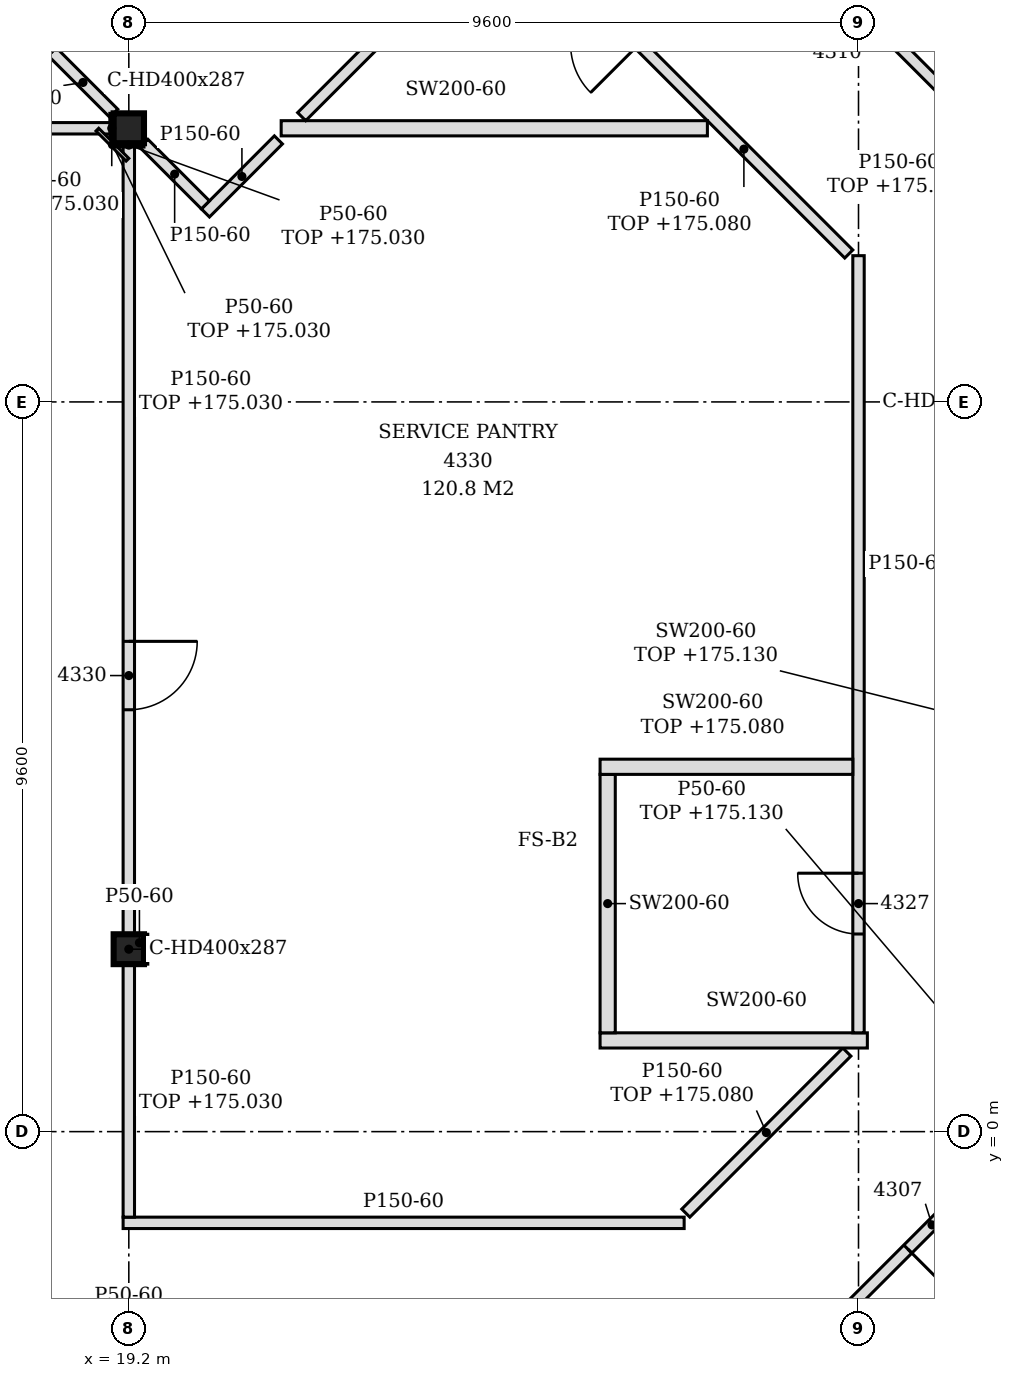
"""IFC4 building model, lengths in metres.
Left out: names, types, materials, properties, quantities, classifications, styles, units other than length and angle.
Written with IfcOpenShell. Run it as: python <this file> out.ifc"""

import sys

from ifc_helpers import new_model, si_unit, direction, frame, frame_2d, origin, origin_2d, place, context, subcontext, project, spatial, polyline, rectangle, i_section, outline, extrude, element, fill, save


model = new_model("IFC4")
c1 = context("Model", 3, precision=1e-05, world=origin(), true_north=direction((0.0, 1.0)))
c2 = subcontext(c1, "Body", "Model", "MODEL_VIEW")
j1 = project(units=[si_unit("LENGTHUNIT", "METRE"), si_unit("PLANEANGLEUNIT", "RADIAN")], contexts=[c1])
p1 = place(None, origin())
s1 = spatial("IfcSite", under=j1, at=p1, CompositionType="ELEMENT")
p2 = place(p1, origin())
s2 = spatial("IfcBuilding", under=s1, at=p2, CompositionType="ELEMENT")
p3 = place(p2, frame((0.0, 0.0, 172.2)))
s3 = spatial("IfcBuildingStorey", under=s2, at=p3, CompositionType="ELEMENT", Elevation=172.2)
for number, where, z_axis, x_axis in (
    (1, (19.2, 2.4, -0.15), (0.0, 0.0, 1.0), (1.0, 0.0, 0.0)),
    (2, (19.2, 13.2, -0.15), (0.0, 0.0, 1.0), (1.0, 0.0, 0.0)),
):
    element("IfcColumn", number, at=place(p3, frame(where, z_axis=z_axis, x_axis=x_axis)), inside=s3, PredefinedType="COLUMN", context=c2, shape_type="SweptSolid", body=[
        extrude(i_section(OverallWidth=0.399, OverallDepth=0.393, WebThickness=0.023, FlangeThickness=0.037, FilletRadius=0.015, at=origin_2d()), origin(), (0.0, 0.0, 1.0), 3.6),
    ])
p4 = place(p3, frame((22.722, -8.272, 0.0), z_axis=(0.0, 0.0, 1.0), x_axis=(0.707106781187, 0.707106781187, 0.0)))
e3 = element("IfcWall", 3, at=p4, inside=s3, PredefinedType="PARTITIONING", context=c2, shape_type="SweptSolid", body=[
    extrude(rectangle(XDim=11.549, YDim=0.15, at=frame_2d((5.774, 0.0))), origin(), (0.0, 0.0, 1.0), 2.88),
])
p5 = place(p4, frame((2.873, 0.0, 0.0)))
e4 = element("IfcOpeningElement", 4, at=p5, cuts=e3, PredefinedType="OPENING", context=c2, shape_type="SweptSolid", body=[
    extrude(rectangle(XDim=0.9, YDim=2.1, at=frame_2d((0.45, 1.05))), frame((0.0, 0.085, 0.0), z_axis=(0.0, -1.0, 0.0), x_axis=(1.0, 0.0, 0.0)), (0.0, 0.0, 1.0), 0.17),
])
p6 = place(p4, frame((6.143, 0.0, 0.0)))
e5 = element("IfcOpeningElement", 5, at=p6, cuts=e3, PredefinedType="OPENING", context=c2, shape_type="SweptSolid", body=[
    extrude(rectangle(XDim=0.9, YDim=2.1, at=frame_2d((0.45, 1.05))), frame((0.0, 0.085, 0.0), z_axis=(0.0, -1.0, 0.0), x_axis=(1.0, 0.0, 0.0)), (0.0, 0.0, 1.0), 0.17),
])
p7 = place(p4, frame((9.513, 0.0, 0.0)))
e6 = element("IfcOpeningElement", 6, at=p7, cuts=e3, PredefinedType="OPENING", context=c2, shape_type="SweptSolid", body=[
    extrude(rectangle(XDim=0.9, YDim=2.1, at=frame_2d((0.45, 1.05))), frame((0.0, 0.085, 0.0), z_axis=(0.0, -1.0, 0.0), x_axis=(1.0, 0.0, 0.0)), (0.0, 0.0, 1.0), 0.17),
])
p8 = place(p3, frame((19.125, -1.2, 0.0), z_axis=(0.0, 0.0, 1.0), x_axis=(1.0, 0.0, 0.0)))
e7 = element("IfcWall", 7, at=p8, inside=s3, PredefinedType="PARTITIONING", context=c2, shape_type="SweptSolid", body=[
    extrude(outline(polyline([(0.0, 0.0), (7.381, 0.0), (7.381, 3.45), (0.225, 3.45), (0.223, 2.83), (0.0, 2.83), (0.0, 0.0)])), frame((0.0, 0.075, 0.0), z_axis=(0.0, -1.0, 0.0), x_axis=(1.0, 0.0, 0.0)), (0.0, 0.0, 1.0), 0.15),
])
p9 = place(p3, frame((19.2, -1.125, 0.0), z_axis=(0.0, 0.0, 1.0), x_axis=(0.0, 1.0, 0.0)))
e8 = element("IfcWall", 8, at=p9, inside=s3, PredefinedType="PARTITIONING", context=c2, shape_type="SweptSolid", body=[
    extrude(rectangle(XDim=3.329, YDim=0.15, at=frame_2d((1.664, 0.0))), origin(), (0.0, 0.0, 1.0), 2.83),
])
p10 = place(p3, frame((26.528, -1.072, 0.0), z_axis=(0.0, 0.0, 1.0), x_axis=(0.707106781187, 0.707106781187, 0.0)))
e9 = element("IfcWall", 9, at=p10, inside=s3, PredefinedType="PARTITIONING", context=c2, shape_type="SweptSolid", body=[
    extrude(rectangle(XDim=2.997, YDim=0.15, at=frame_2d((1.498, 0.0))), origin(), (0.0, 0.0, 1.0), 2.88),
])
p11 = place(p3, frame((25.4, 1.2, 0.0), z_axis=(0.0, 0.0, 1.0), x_axis=(1.0, 0.0, 0.0)))
e10 = element("IfcWall", 10, at=p11, inside=s3, PredefinedType="PARTITIONING", context=c2, shape_type="SweptSolid", body=[
    extrude(rectangle(XDim=3.517, YDim=0.2, at=frame_2d((1.758, 0.0))), origin(), (0.0, 0.0, 1.0), 3.45),
])
p12 = place(p3, frame((25.5, 1.3, 0.0), z_axis=(0.0, 0.0, 1.0), x_axis=(0.0, 1.0, 0.0)))
e11 = element("IfcWall", 11, at=p12, inside=s3, PredefinedType="PARTITIONING", context=c2, shape_type="SweptSolid", body=[
    extrude(outline(polyline([(0.0, 0.0), (3.4, 0.0), (3.4, 2.88), (3.245, 2.88), (3.243, 3.45), (0.0, 3.45), (0.0, 0.0)])), frame((0.0, 0.1, 0.0), z_axis=(0.0, -1.0, 0.0), x_axis=(1.0, 0.0, 0.0)), (0.0, 0.0, 1.0), 0.2),
])
p13 = place(p3, frame((28.8, 1.3, 0.0), z_axis=(0.0, 0.0, 1.0), x_axis=(0.0, 1.0, 0.0)))
e12 = element("IfcWall", 12, at=p13, inside=s3, PredefinedType="PARTITIONING", context=c2, shape_type="SweptSolid", body=[
    extrude(outline(polyline([(0.0, 0.0), (10.224, 0.0), (10.224, 3.45), (8.255, 3.45), (8.253, 2.88), (8.045, 2.88), (8.043, 3.45), (3.455, 3.45), (3.453, 2.88), (3.245, 2.88), (3.243, 3.45), (0.0, 3.45), (0.0, 0.0)])), frame((0.0, 0.075, 0.0), z_axis=(0.0, -1.0, 0.0), x_axis=(1.0, 0.0, 0.0)), (0.0, 0.0, 1.0), 0.15),
])
p14 = place(p13, frame((1.3, 0.0, 0.0)))
e13 = element("IfcOpeningElement", 13, at=p14, cuts=e12, PredefinedType="OPENING", context=c2, shape_type="SweptSolid", body=[
    extrude(rectangle(XDim=0.8, YDim=2.1, at=frame_2d((0.4, 1.05))), frame((0.0, 0.085, 0.0), z_axis=(0.0, -1.0, 0.0), x_axis=(1.0, 0.0, 0.0)), (0.0, 0.0, 1.0), 0.17),
])
p15 = place(p3, frame((19.2, 2.596, 0.0), z_axis=(0.0, 0.0, 1.0), x_axis=(0.0, 1.0, 0.0)))
e14 = element("IfcWall", 14, at=p15, inside=s3, PredefinedType="PARTITIONING", context=c2, shape_type="SweptSolid", body=[
    extrude(rectangle(XDim=10.407, YDim=0.15, at=frame_2d((5.204, 0.0))), origin(), (0.0, 0.0, 1.0), 2.83),
])
p16 = place(p15, frame((2.954, 0.0, 0.0)))
e15 = element("IfcOpeningElement", 15, at=p16, cuts=e14, PredefinedType="OPENING", context=c2, shape_type="SweptSolid", body=[
    extrude(rectangle(XDim=0.9, YDim=2.1, at=frame_2d((0.45, 1.05))), frame((0.0, 0.085, 0.0), z_axis=(0.0, -1.0, 0.0), x_axis=(1.0, 0.0, 0.0)), (0.0, 0.0, 1.0), 0.17),
])
p17 = place(p3, frame((25.4, 4.8, 0.0), z_axis=(0.0, 0.0, 1.0), x_axis=(1.0, 0.0, 0.0)))
e16 = element("IfcWall", 16, at=p17, inside=s3, PredefinedType="PARTITIONING", context=c2, shape_type="SweptSolid", body=[
    extrude(rectangle(XDim=3.325, YDim=0.2, at=frame_2d((1.663, 0.0))), origin(), (0.0, 0.0, 1.0), 2.88),
])
p18 = place(p3, frame((28.672, 11.546, 0.0), z_axis=(0.0, 0.0, 1.0), x_axis=(-0.707106781187, 0.707106781187, 0.0)))
e17 = element("IfcWall", 17, at=p18, inside=s3, PredefinedType="PARTITIONING", context=c2, shape_type="SweptSolid", body=[
    extrude(rectangle(XDim=6.292, YDim=0.15, at=frame_2d((3.146, 0.0))), origin(), (0.0, 0.0, 1.0), 2.88),
])
p19 = place(p18, frame((3.903, 0.0, 0.0)))
e18 = element("IfcOpeningElement", 18, at=p19, cuts=e17, PredefinedType="OPENING", context=c2, shape_type="SweptSolid", body=[
    extrude(rectangle(XDim=0.9, YDim=2.1, at=frame_2d((0.45, 1.05))), frame((0.0, 0.085, 0.0), z_axis=(0.0, -1.0, 0.0), x_axis=(1.0, 0.0, 0.0)), (0.0, 0.0, 1.0), 0.17),
])
p20 = place(p3, frame((20.208, 12.086, 0.0), z_axis=(0.0, 0.0, 1.0), x_axis=(0.706747296365, 0.707466083343, 0.0)))
e19 = element("IfcWall", 19, at=p20, inside=s3, PredefinedType="PARTITIONING", context=c2, shape_type="SweptSolid", body=[
    extrude(rectangle(XDim=1.359, YDim=0.15, at=frame_2d((0.679, 0.0))), origin(), (0.0, 0.0, 1.0), 3.45),
])
p21 = place(p3, frame((20.208, 12.192, 0.0), z_axis=(0.0, 0.0, 1.0), x_axis=(-0.70721334539, 0.707000200921, 0.0)))
e20 = element("IfcWall", 20, at=p21, inside=s3, PredefinedType="PARTITIONING", context=c2, shape_type="SweptSolid", body=[
    extrude(rectangle(XDim=1.146, YDim=0.15, at=frame_2d((0.573, 0.0))), origin(), (0.0, 0.0, 1.0), 3.45),
])
p22 = place(p3, frame((31.072, 12.54, 0.0), z_axis=(0.0, 0.0, 1.0), x_axis=(-0.707106781187, 0.707106781187, 0.0)))
e21 = element("IfcWall", 21, at=p22, inside=s3, PredefinedType="PARTITIONING", context=c2, shape_type="SweptSolid", body=[
    extrude(rectangle(XDim=4.61, YDim=0.15, at=frame_2d((2.305, 0.0))), origin(), (0.0, 0.0, 1.0), 2.88),
])
p23 = place(p22, frame((2.525, 0.0, 0.0)))
e22 = element("IfcOpeningElement", 22, at=p23, cuts=e21, PredefinedType="OPENING", context=c2, shape_type="SweptSolid", body=[
    extrude(rectangle(XDim=0.9, YDim=2.1, at=frame_2d((0.45, 1.05))), frame((0.0, 0.085, 0.0), z_axis=(0.0, -1.0, 0.0), x_axis=(1.0, 0.0, 0.0)), (0.0, 0.0, 1.0), 0.17),
])
p24 = place(p3, frame((7.399, 13.2, 0.0), z_axis=(0.0, 0.0, 1.0), x_axis=(1.0, 0.0, 0.0)))
e23 = element("IfcWall", 23, at=p24, inside=s3, PredefinedType="PARTITIONING", context=c2, shape_type="SweptSolid", body=[
    extrude(rectangle(XDim=11.601, YDim=0.15, at=frame_2d((5.801, 0.0))), origin(), (0.0, 0.0, 1.0), 2.83),
])
p25 = place(p24, frame((5.351, 0.0, 0.0)))
e24 = element("IfcOpeningElement", 24, at=p25, cuts=e23, PredefinedType="OPENING", context=c2, shape_type="SweptSolid", body=[
    extrude(rectangle(XDim=0.9, YDim=2.1, at=frame_2d((0.45, 1.05))), frame((0.0, 0.085, 0.0), z_axis=(0.0, -1.0, 0.0), x_axis=(1.0, 0.0, 0.0)), (0.0, 0.0, 1.0), 0.17),
])
p26 = place(p3, frame((21.205, 13.2, 0.0), z_axis=(0.0, 0.0, 1.0), x_axis=(1.0, 0.0, 0.0)))
e25 = element("IfcWall", 25, at=p26, inside=s3, PredefinedType="PARTITIONING", context=c2, shape_type="SweptSolid", body=[
    extrude(rectangle(XDim=5.607, YDim=0.2, at=frame_2d((2.804, 0.0))), origin(), (0.0, 0.0, 1.0), 3.45),
])
p27 = place(p3, frame((19.002, 13.398, 0.0), z_axis=(0.0, 0.0, 1.0), x_axis=(-0.707000200921, 0.70721334539, 0.0)))
e26 = element("IfcWall", 26, at=p27, inside=s3, PredefinedType="PARTITIONING", context=c2, shape_type="SweptSolid", body=[
    extrude(rectangle(XDim=1.146, YDim=0.15, at=frame_2d((0.573, 0.0))), origin(), (0.0, 0.0, 1.0), 3.45),
])
p28 = place(p3, frame((21.474, 13.353, 0.0), z_axis=(0.0, 0.0, 1.0), x_axis=(0.707200993001, 0.707012556818, 0.0)))
e27 = element("IfcWall", 27, at=p28, inside=s3, PredefinedType="PARTITIONING", context=c2, shape_type="SweptSolid", body=[
    extrude(rectangle(XDim=3.887, YDim=0.15, at=frame_2d((1.943, 0.0))), origin(), (0.0, 0.0, 1.0), 2.88),
])
p29 = place(p3, frame((18.086, 14.208, 0.0), z_axis=(0.0, 0.0, 1.0), x_axis=(0.707466083343, 0.706747296365, 0.0)))
e28 = element("IfcWall", 28, at=p29, inside=s3, PredefinedType="PARTITIONING", context=c2, shape_type="SweptSolid", body=[
    extrude(rectangle(XDim=1.359, YDim=0.15, at=frame_2d((0.679, 0.0))), origin(), (0.0, 0.0, 1.0), 2.73),
])
p30 = place(p3, frame((19.425, 2.204, 0.0), z_axis=(0.0, 0.0, 1.0), x_axis=(0.0, 1.0, 0.0)))
e29 = element("IfcWall", 29, at=p30, inside=s3, PredefinedType="PARTITIONING", context=c2, shape_type="SweptSolid", body=[
    extrude(rectangle(XDim=0.393, YDim=0.05, at=frame_2d((0.196, 0.0))), origin(), (0.0, 0.0, 1.0), 3.45),
])
p31 = place(p3, frame((18.976, 13.003, 0.0), z_axis=(0.0, 0.0, 1.0), x_axis=(0.0, 1.0, 0.0)))
e30 = element("IfcWall", 30, at=p31, inside=s3, PredefinedType="PARTITIONING", context=c2, shape_type="SweptSolid", body=[
    extrude(rectangle(XDim=0.393, YDim=0.05, at=frame_2d((0.197, 0.0))), origin(), (0.0, 0.0, 1.0), 2.83),
])
p32 = place(p3, frame((19.182, 12.786, 0.0), z_axis=(0.0, 0.0, 1.0), x_axis=(-0.707106781187, 0.707106781187, 0.0)))
e31 = element("IfcWall", 31, at=p32, inside=s3, PredefinedType="PARTITIONING", context=c2, shape_type="SweptSolid", body=[
    extrude(rectangle(XDim=0.56, YDim=0.05, at=frame_2d((0.28, 0.0))), origin(), (0.0, 0.0, 1.0), 2.83),
])
p33 = place(p3, frame((19.0, 12.979, 0.0), z_axis=(0.0, 0.0, 1.0), x_axis=(1.0, 0.0, 0.0)))
e32 = element("IfcWall", 32, at=p33, inside=s3, PredefinedType="PARTITIONING", context=c2, shape_type="SweptSolid", body=[
    extrude(rectangle(XDim=0.399, YDim=0.05, at=frame_2d((0.199, 0.0))), origin(), (0.0, 0.0, 1.0), 2.83),
])
p34 = place(p7, frame((0.9, 0.0, 0.0), z_axis=(0.0, 0.0, 1.0), x_axis=(-1.0, 0.0, 0.0)))
e33 = element("IfcDoor", 33, at=p34, inside=s3, OperationType="SINGLE_SWING_RIGHT", PredefinedType="DOOR", context=c2, shape_type="SweptSolid", body=[
    extrude(rectangle(XDim=0.9, YDim=2.1, at=frame_2d((0.45, 1.05))), frame((0.0, 0.025, 0.0), z_axis=(0.0, -1.0, 0.0), x_axis=(1.0, 0.0, 0.0)), (0.0, 0.0, 1.0), 0.05),
])
fill(e6, e33)
p35 = place(p14, origin())
e34 = element("IfcDoor", 34, at=p35, inside=s3, OperationType="SINGLE_SWING_RIGHT", PredefinedType="DOOR", context=c2, shape_type="SweptSolid", body=[
    extrude(rectangle(XDim=0.8, YDim=2.1, at=frame_2d((0.4, 1.05))), frame((0.0, 0.025, 0.0), z_axis=(0.0, -1.0, 0.0), x_axis=(1.0, 0.0, 0.0)), (0.0, 0.0, 1.0), 0.05),
])
fill(e13, e34)
p36 = place(p16, frame((0.9, 0.0, 0.0), z_axis=(0.0, 0.0, 1.0), x_axis=(-1.0, 0.0, 0.0)))
e35 = element("IfcDoor", 35, at=p36, inside=s3, OperationType="SINGLE_SWING_LEFT", PredefinedType="DOOR", context=c2, shape_type="SweptSolid", body=[
    extrude(rectangle(XDim=0.9, YDim=2.1, at=frame_2d((0.45, 1.05))), frame((0.0, 0.025, 0.0), z_axis=(0.0, -1.0, 0.0), x_axis=(1.0, 0.0, 0.0)), (0.0, 0.0, 1.0), 0.05),
])
fill(e15, e35)
save(model, sys.argv[1])
